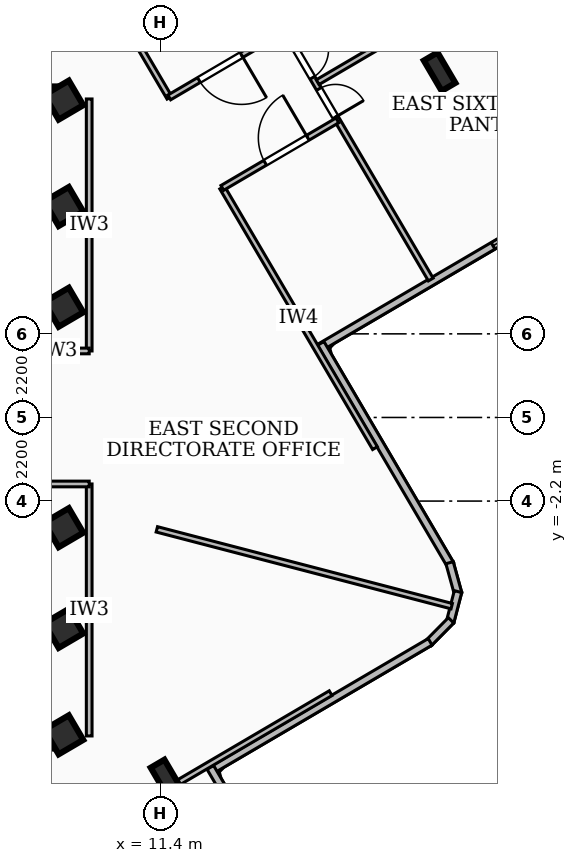
"""IFC4 building model, lengths in metres.
Left out: names, types, materials, properties, quantities, classifications, styles, units other than length and angle.
Written with IfcOpenShell. Run it as: python <this file> out.ifc"""

import sys

from ifc_helpers import new_model, si_unit, direction, frame, frame_2d, origin, origin_2d, place, context, subcontext, project, spatial, rectangle, i_section, extrude, element, fill, save


model = new_model("IFC4")
c1 = context("Model", 3, precision=1e-05, world=origin(), true_north=direction((0.0, 1.0)))
c2 = subcontext(c1, "Body", "Model", "MODEL_VIEW")
j1 = project(units=[si_unit("LENGTHUNIT", "METRE"), si_unit("PLANEANGLEUNIT", "RADIAN")], contexts=[c1])
p1 = place(None, origin())
s1 = spatial("IfcSite", under=j1, at=p1, CompositionType="ELEMENT")
p2 = place(p1, origin())
s2 = spatial("IfcBuilding", under=s1, at=p2, CompositionType="ELEMENT")
p3 = place(p2, frame((0.0, 0.0, 205.2)))
s3 = spatial("IfcBuildingStorey", under=s2, at=p3, CompositionType="ELEMENT", Elevation=205.2)
for number, where, z_axis, x_axis in (
    (1, (-8.78, 8.51, 0.0), (0.0, 0.0, 1.0), (1.0, 0.0, 0.0)),
    (2, (8.78, -8.51, 0.0), (0.0, 0.0, 1.0), (-1.0, 0.0, 0.0)),
):
    element("IfcWall", number, at=place(p3, frame(where, z_axis=z_axis, x_axis=x_axis)), inside=s3, PredefinedType="SHEAR", context=c2, shape_type="SweptSolid", body=[
        extrude(rectangle(XDim=17.56, YDim=0.4, at=frame_2d((8.78, 0.0))), origin(), (0.0, 0.0, 1.0), 3.16),
    ])
for number, where, z_axis, x_axis in (
    (3, (8.85, -5.55, 0.0), (0.0, 0.0, 1.0), (0.863, 0.506, 0.0)),
    (4, (8.85, -2.9, 0.0), (0.0, 0.0, 1.0), (0.863, 0.506, 0.0)),
    (5, (8.85, 2.9, 0.0), (0.0, 0.0, 1.0), (0.863, 0.506, 0.0)),
    (6, (8.85, 5.55, 0.0), (0.0, 0.0, 1.0), (0.863, 0.506, 0.0)),
    (7, (8.85, -8.35, 0.0), (0.0, 0.0, 1.0), (0.863, 0.506, 0.0)),
    (8, (8.85, 8.35, 0.0), (0.0, 0.0, 1.0), (0.863, 0.506, 0.0)),
):
    element("IfcColumn", number, at=place(p3, frame(where, z_axis=z_axis, x_axis=x_axis)), inside=s3, PredefinedType="COLUMN", context=c2, shape_type="SweptSolid", body=[
        extrude(rectangle(XDim=0.75, YDim=0.75, at=origin_2d()), origin(), (0.0, 0.0, 1.0), 3.42),
    ])
for number, where, z_axis, x_axis in (
    (9, (18.741, 9.097, 0.0), (0.0, 0.0, 1.0), (0.863, 0.506, 0.0)),
    (10, (11.554, -9.51, 0.0), (0.0, 0.0, 1.0), (0.863, 0.506, 0.0)),
):
    element("IfcColumn", number, at=place(p3, frame(where, z_axis=z_axis, x_axis=x_axis)), inside=s3, PredefinedType="COLUMN", context=c2, shape_type="SweptSolid", body=[
        extrude(i_section(OverallWidth=0.418, OverallDepth=0.927, WebThickness=0.019, FlangeThickness=0.032, at=origin_2d()), origin(), (0.0, 0.0, 1.0), 3.42),
    ])
p4 = place(p3, frame((18.869, 16.65, 0.0), z_axis=(0.0, 0.0, 1.0), x_axis=(0.505984418435, -0.862542618252, 0.0)))
e11 = element("IfcWall", 11, at=p4, inside=s3, PredefinedType="SOLIDWALL", context=c2, shape_type="SweptSolid", body=[
    extrude(rectangle(XDim=9.625, YDim=0.2, at=frame_2d((4.812, 0.0))), origin(), (0.0, 0.0, 1.0), 3.16),
])
p5 = place(p4, frame((0.85, 0.0, 0.85)))
e12 = element("IfcOpeningElement", 12, at=p5, cuts=e11, PredefinedType="OPENING", context=c2, shape_type="SweptSolid", body=[
    extrude(rectangle(XDim=2.7, YDim=1.85, at=frame_2d((1.35, 0.925))), frame((0.0, 0.11, 0.0), z_axis=(0.0, -1.0, 0.0), x_axis=(1.0, 0.0, 0.0)), (0.0, 0.0, 1.0), 0.22),
])
p6 = place(p3, frame((23.209, 6.312, 0.0), z_axis=(0.0, 0.0, 1.0), x_axis=(-0.862602827395, -0.505881766988, 0.0)))
e13 = element("IfcWall", 13, at=p6, inside=s3, PredefinedType="SOLIDWALL", context=c2, shape_type="SweptSolid", body=[
    extrude(rectangle(XDim=8.842, YDim=0.2, at=frame_2d((4.421, 0.0))), origin(), (0.0, 0.0, 1.0), 3.16),
])
p7 = place(p6, frame((0.85, 0.0, 0.85)))
e14 = element("IfcOpeningElement", 14, at=p7, cuts=e13, PredefinedType="OPENING", context=c2, shape_type="SweptSolid", body=[
    extrude(rectangle(XDim=2.7, YDim=1.65, at=frame_2d((1.35, 0.825))), frame((0.0, 0.11, 0.0), z_axis=(0.0, -1.0, 0.0), x_axis=(1.0, 0.0, 0.0)), (0.0, 0.0, 1.0), 0.22),
])
p8 = place(p3, frame((15.611, 1.948, 0.0), z_axis=(0.0, 0.0, 1.0), x_axis=(0.505999167705, -0.862533965872, 0.0)))
e15 = element("IfcWall", 15, at=p8, inside=s3, PredefinedType="SOLIDWALL", context=c2, shape_type="SweptSolid", body=[
    extrude(rectangle(XDim=6.743, YDim=0.2, at=frame_2d((3.372, 0.0))), origin(), (0.0, 0.0, 1.0), 3.16),
])
p9 = place(p3, frame((19.003, -3.822, 0.0), z_axis=(0.0, 0.0, 1.0), x_axis=(0.266246353668, -0.963905015631, 0.0)))
e16 = element("IfcWall", 16, at=p9, inside=s3, PredefinedType="SOLIDWALL", context=c2, shape_type="SweptSolid", body=[
    extrude(rectangle(XDim=0.838, YDim=0.2, at=frame_2d((0.419, 0.0))), origin(), (0.0, 0.0, 1.0), 3.16),
])
p10 = place(p3, frame((19.225, -4.582, 0.0), z_axis=(0.0, 0.0, 1.0), x_axis=(-0.251167733737, -0.967943577658, 0.0)))
e17 = element("IfcWall", 17, at=p10, inside=s3, PredefinedType="SOLIDWALL", context=c2, shape_type="SweptSolid", body=[
    extrude(rectangle(XDim=0.824, YDim=0.2, at=frame_2d((0.412, 0.0))), origin(), (0.0, 0.0, 1.0), 3.16),
])
p11 = place(p3, frame((19.042, -5.338, 0.0), z_axis=(0.0, 0.0, 1.0), x_axis=(-0.702877524881, -0.711310891957, 0.0)))
e18 = element("IfcWall", 18, at=p11, inside=s3, PredefinedType="SOLIDWALL", context=c2, shape_type="SweptSolid", body=[
    extrude(rectangle(XDim=0.84, YDim=0.2, at=frame_2d((0.42, 0.0))), origin(), (0.0, 0.0, 1.0), 3.16),
])
p12 = place(p3, frame((18.492, -5.904, 0.0), z_axis=(0.0, 0.0, 1.0), x_axis=(-0.86245977502, -0.506125613333, 0.0)))
e19 = element("IfcWall", 19, at=p12, inside=s3, PredefinedType="SOLIDWALL", context=c2, shape_type="SweptSolid", body=[
    extrude(rectangle(XDim=6.741, YDim=0.2, at=frame_2d((3.371, 0.0))), origin(), (0.0, 0.0, 1.0), 3.16),
])
p13 = place(p3, frame((12.707, -9.207, 0.0), z_axis=(0.0, 0.0, 1.0), x_axis=(0.505936854923, -0.862570518178, 0.0)))
e20 = element("IfcWall", 20, at=p13, inside=s3, PredefinedType="SOLIDWALL", context=c2, shape_type="SweptSolid", body=[
    extrude(rectangle(XDim=4.641, YDim=0.2, at=frame_2d((2.32, 0.0))), origin(), (0.0, 0.0, 1.0), 3.16),
])
p14 = place(p3, frame((9.52, 1.75, 0.0), z_axis=(0.0, 0.0, 1.0), x_axis=(0.0, 1.0, 0.0)))
e21 = element("IfcWall", 21, at=p14, inside=s3, PredefinedType="PARTITIONING", context=c2, shape_type="SweptSolid", body=[
    extrude(rectangle(XDim=6.63, YDim=0.15, at=frame_2d((3.315, 0.0))), origin(), (0.0, 0.0, 1.0), 2.53),
])
p15 = place(p3, frame((7.85, 1.75, 0.0), z_axis=(0.0, 0.0, 1.0), x_axis=(1.0, 0.0, 0.0)))
e22 = element("IfcWall", 22, at=p15, inside=s3, PredefinedType="PARTITIONING", context=c2, shape_type="SweptSolid", body=[
    extrude(rectangle(XDim=1.67, YDim=0.15, at=frame_2d((0.835, 0.0))), origin(), (0.0, 0.0, 1.0), 2.39),
])
p16 = place(p3, frame((9.52, -8.38, 0.0), z_axis=(0.0, 0.0, 1.0), x_axis=(0.0, 1.0, 0.0)))
e23 = element("IfcWall", 23, at=p16, inside=s3, PredefinedType="PARTITIONING", context=c2, shape_type="SweptSolid", body=[
    extrude(rectangle(XDim=6.63, YDim=0.15, at=frame_2d((3.315, 0.0))), origin(), (0.0, 0.0, 1.0), 3.16),
])
p17 = place(p3, frame((7.85, -1.75, 0.0), z_axis=(0.0, 0.0, 1.0), x_axis=(1.0, 0.0, 0.0)))
e24 = element("IfcWall", 24, at=p17, inside=s3, PredefinedType="PARTITIONING", context=c2, shape_type="SweptSolid", body=[
    extrude(rectangle(XDim=1.67, YDim=0.15, at=frame_2d((0.835, 0.0))), origin(), (0.0, 0.0, 1.0), 2.39),
])
p18 = place(p3, frame((11.3, -2.944, 0.0), z_axis=(0.0, 0.0, 1.0), x_axis=(0.967711624716, -0.252059936106, 0.0)))
e25 = element("IfcWall", 25, at=p18, inside=s3, PredefinedType="PARTITIONING", context=c2, shape_type="SweptSolid", body=[
    extrude(rectangle(XDim=8.018, YDim=0.145, at=frame_2d((4.009, 0.0))), origin(), (0.0, 0.0, 1.0), 3.16),
])
p19 = place(p3, frame((11.632, 8.413, 0.0), z_axis=(0.0, 0.0, 1.0), x_axis=(-0.506057561451, 0.862499706955, 0.0)))
e26 = element("IfcWall", 26, at=p19, inside=s3, PredefinedType="PARTITIONING", context=c2, shape_type="SweptSolid", body=[
    extrude(rectangle(XDim=7.95, YDim=0.145, at=frame_2d((3.975, 0.0))), origin(), (0.0, 0.0, 1.0), 2.53),
])
p20 = place(p3, frame((17.041, -0.807, 0.0), z_axis=(0.0, 0.0, 1.0), x_axis=(-0.505943324238, 0.862566723598, 0.0)))
e27 = element("IfcWall", 27, at=p20, inside=s3, PredefinedType="PARTITIONING", context=c2, shape_type="SweptSolid", body=[
    extrude(rectangle(XDim=7.949, YDim=0.145, at=frame_2d((3.975, 0.0))), origin(), (0.0, 0.0, 1.0), 3.16),
])
p21 = place(p3, frame((14.654, 10.198, 0.0), z_axis=(0.0, 0.0, 1.0), x_axis=(-0.862375516706, -0.506269165747, 0.0)))
e28 = element("IfcWall", 28, at=p21, inside=s3, PredefinedType="PARTITIONING", context=c2, shape_type="SweptSolid", body=[
    extrude(rectangle(XDim=3.51, YDim=0.145, at=frame_2d((1.755, 0.0))), origin(), (0.0, 0.0, 1.0), 2.53),
])
p22 = place(p21, frame((1.305, 0.0, 0.0)))
e29 = element("IfcOpeningElement", 29, at=p22, cuts=e28, PredefinedType="OPENING", context=c2, shape_type="SweptSolid", body=[
    extrude(rectangle(XDim=1.3, YDim=2.1, at=frame_2d((0.65, 1.05))), frame((0.0, 0.083, 0.0), z_axis=(0.0, -1.0, 0.0), x_axis=(1.0, 0.0, 0.0)), (0.0, 0.0, 1.0), 0.165),
])
p23 = place(p3, frame((13.024, 6.041, 0.0), z_axis=(0.0, 0.0, 1.0), x_axis=(0.862527334663, 0.506010471195, 0.0)))
e30 = element("IfcWall", 30, at=p23, inside=s3, PredefinedType="PARTITIONING", context=c2, shape_type="SweptSolid", body=[
    extrude(rectangle(XDim=3.51, YDim=0.145, at=frame_2d((1.755, 0.0))), origin(), (0.0, 0.0, 1.0), 3.16),
])
p24 = place(p23, frame((1.305, 0.0, 0.0)))
e31 = element("IfcOpeningElement", 31, at=p24, cuts=e30, PredefinedType="OPENING", context=c2, shape_type="SweptSolid", body=[
    extrude(rectangle(XDim=1.3, YDim=2.1, at=frame_2d((0.65, 1.05))), frame((0.0, 0.083, 0.0), z_axis=(0.0, -1.0, 0.0), x_axis=(1.0, 0.0, 0.0)), (0.0, 0.0, 1.0), 0.165),
])
p25 = place(p3, frame((15.531, 8.822, 0.0), z_axis=(0.0, 0.0, 1.0), x_axis=(0.862494081005, 0.506067149923, 0.0)))
e32 = element("IfcWall", 32, at=p25, inside=s3, PredefinedType="PARTITIONING", context=c2, shape_type="SweptSolid", body=[
    extrude(rectangle(XDim=6.776, YDim=0.145, at=frame_2d((3.388, 0.0))), origin(), (0.0, 0.0, 1.0), 2.53),
])
p26 = place(p3, frame((12.198, 14.385, 0.0), z_axis=(0.0, 0.0, 1.0), x_axis=(0.506037527975, -0.862511460956, 0.0)))
e33 = element("IfcWall", 33, at=p26, inside=s3, PredefinedType="PARTITIONING", context=c2, shape_type="SweptSolid", body=[
    extrude(rectangle(XDim=12.469, YDim=0.145, at=frame_2d((6.235, 0.0))), origin(), (0.0, 0.0, 1.0), 2.53),
])
p27 = place(p26, frame((6.655, 0.0, 0.0)))
e34 = element("IfcOpeningElement", 34, at=p27, cuts=e33, PredefinedType="OPENING", context=c2, shape_type="SweptSolid", body=[
    extrude(rectangle(XDim=0.86, YDim=2.04, at=frame_2d((0.43, 1.02))), frame((0.0, 0.083, 0.0), z_axis=(0.0, -1.0, 0.0), x_axis=(1.0, 0.0, 0.0)), (0.0, 0.0, 1.0), 0.165),
])
p28 = place(p26, frame((5.455, 0.0, 0.0)))
e35 = element("IfcOpeningElement", 35, at=p28, cuts=e33, PredefinedType="OPENING", context=c2, shape_type="SweptSolid", body=[
    extrude(rectangle(XDim=0.86, YDim=2.04, at=frame_2d((0.43, 1.02))), frame((0.0, 0.083, 0.0), z_axis=(0.0, -1.0, 0.0), x_axis=(1.0, 0.0, 0.0)), (0.0, 0.0, 1.0), 0.165),
])
p29 = place(p3, frame((15.873, -7.255, 0.0), z_axis=(0.0, 0.0, 1.0), x_axis=(-0.862498672631, -0.506059324299, 0.0)))
e36 = element("IfcWall", 36, at=p29, inside=s3, PredefinedType="PARTITIONING", context=c2, shape_type="SweptSolid", body=[
    extrude(rectangle(XDim=20.039, YDim=0.145, at=frame_2d((10.02, 0.0))), origin(), (0.0, 0.0, 1.0), 2.53),
])
p30 = place(p29, frame((9.42, 0.0, 0.0)))
e37 = element("IfcOpeningElement", 37, at=p30, cuts=e36, PredefinedType="OPENING", context=c2, shape_type="SweptSolid", body=[
    extrude(rectangle(XDim=1.2, YDim=2.1, at=frame_2d((0.6, 1.05))), frame((0.0, 0.083, 0.0), z_axis=(0.0, -1.0, 0.0), x_axis=(1.0, 0.0, 0.0)), (0.0, 0.0, 1.0), 0.165),
])
p31 = place(p7, origin())
e38 = element("IfcWindow", 38, at=p31, inside=s3, PartitioningType="SINGLE_PANEL", PredefinedType="WINDOW", context=c2, shape_type="SweptSolid", body=[
    extrude(rectangle(XDim=2.7, YDim=1.65, at=frame_2d((1.35, 0.825))), frame((0.0, 0.03, 0.0), z_axis=(0.0, -1.0, 0.0), x_axis=(1.0, 0.0, 0.0)), (0.0, 0.0, 1.0), 0.06),
])
fill(e14, e38)
p32 = place(p22, origin())
e39 = element("IfcDoor", 39, at=p32, inside=s3, OperationType="SINGLE_SWING_LEFT", PredefinedType="DOOR", context=c2, shape_type="SweptSolid", body=[
    extrude(rectangle(XDim=1.3, YDim=2.1, at=frame_2d((0.65, 1.05))), frame((0.0, 0.025, 0.0), z_axis=(0.0, -1.0, 0.0), x_axis=(1.0, 0.0, 0.0)), (0.0, 0.0, 1.0), 0.05),
])
fill(e29, e39)
p33 = place(p24, origin())
e40 = element("IfcDoor", 40, at=p33, inside=s3, OperationType="SINGLE_SWING_RIGHT", PredefinedType="DOOR", context=c2, shape_type="SweptSolid", body=[
    extrude(rectangle(XDim=1.3, YDim=2.1, at=frame_2d((0.65, 1.05))), frame((0.0, 0.025, 0.0), z_axis=(0.0, -1.0, 0.0), x_axis=(1.0, 0.0, 0.0)), (0.0, 0.0, 1.0), 0.05),
])
fill(e31, e40)
p34 = place(p27, origin())
e41 = element("IfcDoor", 41, at=p34, inside=s3, OperationType="SINGLE_SWING_RIGHT", PredefinedType="DOOR", context=c2, shape_type="SweptSolid", body=[
    extrude(rectangle(XDim=0.86, YDim=2.04, at=frame_2d((0.43, 1.02))), frame((0.0, 0.025, 0.0), z_axis=(0.0, -1.0, 0.0), x_axis=(1.0, 0.0, 0.0)), (0.0, 0.0, 1.0), 0.05),
])
fill(e34, e41)
p35 = place(p28, origin())
e42 = element("IfcDoor", 42, at=p35, inside=s3, OperationType="SINGLE_SWING_LEFT", PredefinedType="DOOR", context=c2, shape_type="SweptSolid", body=[
    extrude(rectangle(XDim=0.86, YDim=2.04, at=frame_2d((0.43, 1.02))), frame((0.0, 0.025, 0.0), z_axis=(0.0, -1.0, 0.0), x_axis=(1.0, 0.0, 0.0)), (0.0, 0.0, 1.0), 0.05),
])
fill(e35, e42)
save(model, sys.argv[1])
